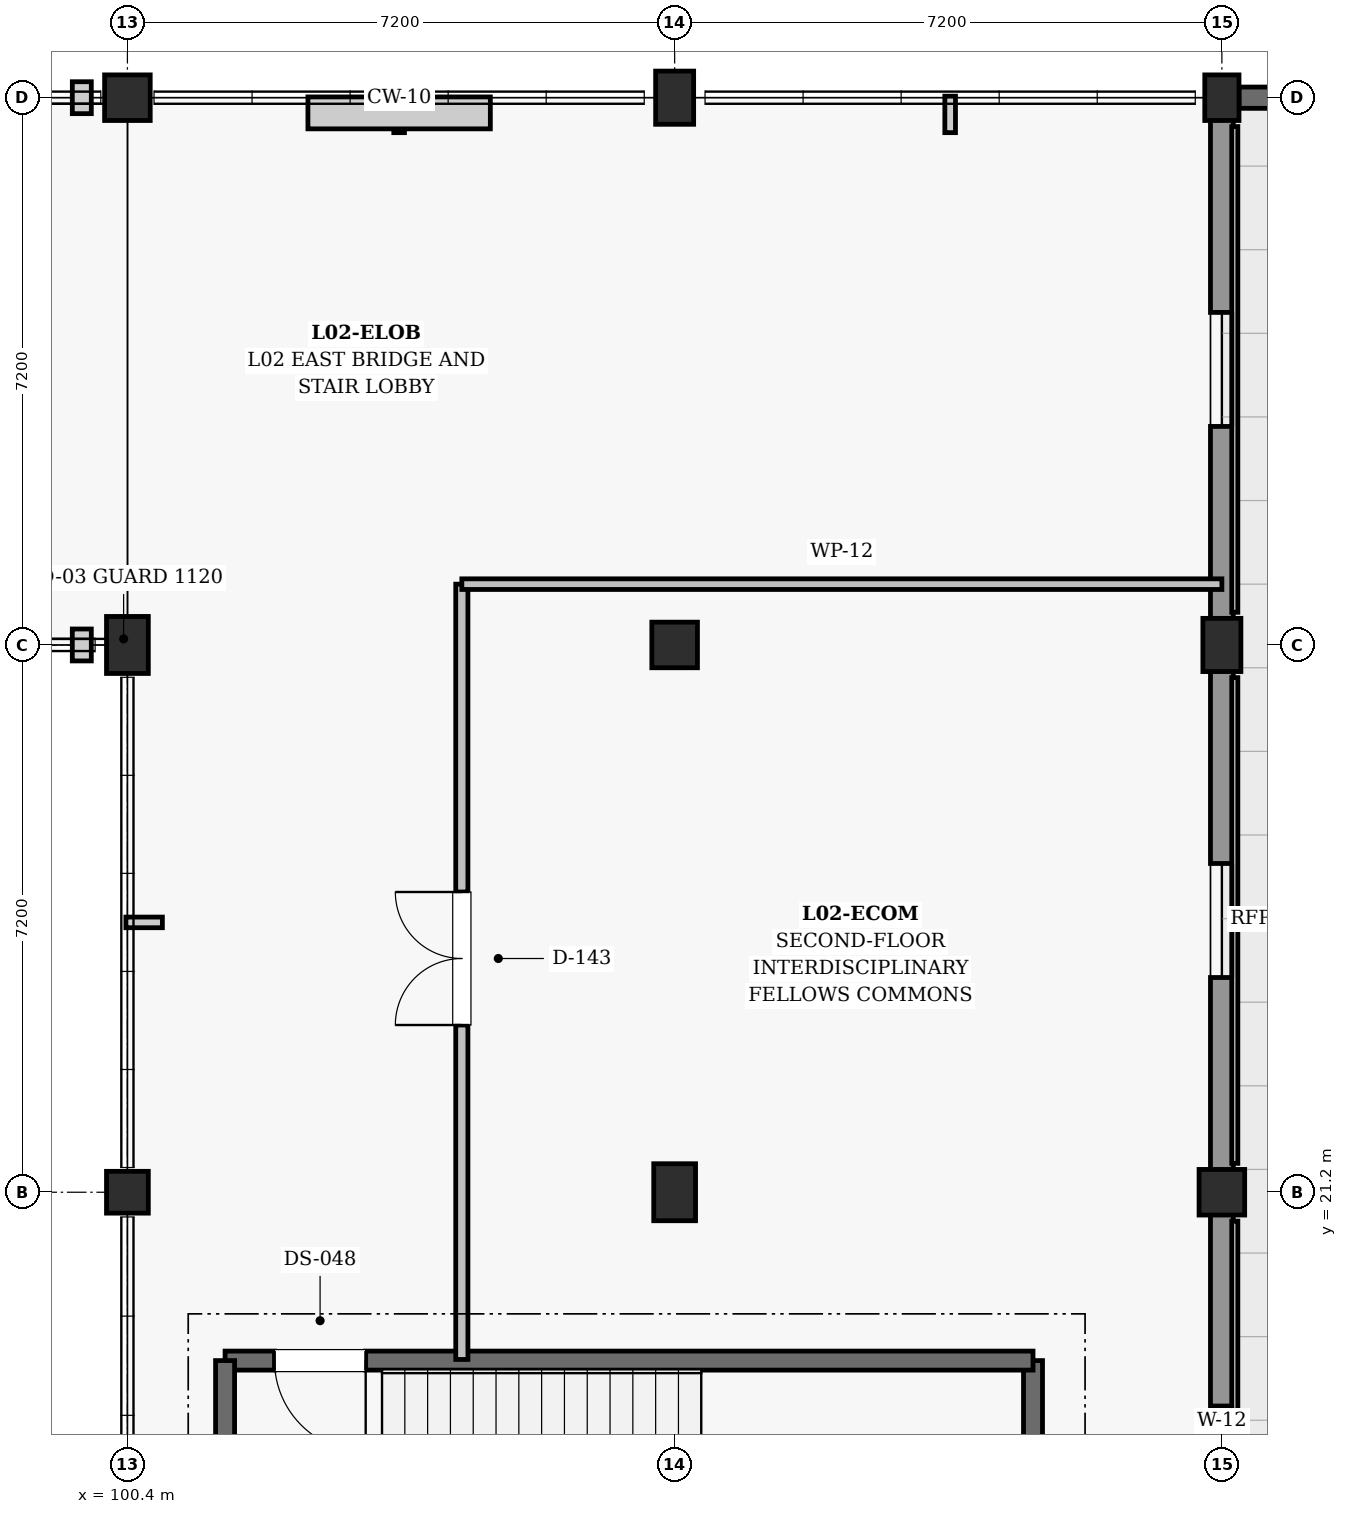
"""IFC4 building model, lengths in metres.
Left out: names, types, materials, properties, quantities, classifications, styles, units other than length and angle.
Written with IfcOpenShell. Run it as: python <this file> out.ifc"""

import sys

from ifc_helpers import new_model, si_unit, direction, frame, frame_2d, origin, origin_2d, place, context, subcontext, project, spatial, polyline, rectangle, outline, extrude, element, fill, save


model = new_model("IFC4")
c1 = context("Model", 3, precision=1e-05, world=origin(), true_north=direction((0.0, 1.0)))
c2 = subcontext(c1, "Body", "Model", "MODEL_VIEW")
j1 = project(units=[si_unit("LENGTHUNIT", "METRE"), si_unit("PLANEANGLEUNIT", "RADIAN")], contexts=[c1])
p1 = place(None, origin())
s1 = spatial("IfcSite", under=j1, at=p1, CompositionType="ELEMENT")
p2 = place(p1, origin())
s2 = spatial("IfcBuilding", under=s1, at=p2, CompositionType="ELEMENT")
p3 = place(p2, frame((0.0, 0.0, 9.9)))
s3 = spatial("IfcBuildingStorey", under=s2, at=p3, CompositionType="ELEMENT", Elevation=9.9)
p4 = place(p3, frame((100.4, 21.2, 0.0), z_axis=(0.0, 0.0, 1.0), x_axis=(1.0, 0.0, 0.0)))
e1 = element("IfcColumn", 1, at=p4, inside=s3, PredefinedType="COLUMN", context=c2, shape_type="SweptSolid", body=[
    extrude(rectangle(XDim=0.55, YDim=0.55, at=origin_2d()), origin(), (0.0, 0.0, 1.0), 4.5),
])
p5 = place(p3, frame((100.4, 28.4, 0.0), z_axis=(0.0, 0.0, 1.0), x_axis=(1.0, 0.0, 0.0)))
e2 = element("IfcColumn", 2, at=p5, inside=s3, PredefinedType="COLUMN", context=c2, shape_type="SweptSolid", body=[
    extrude(rectangle(XDim=0.55, YDim=0.75, at=origin_2d()), origin(), (0.0, 0.0, 1.0), 4.5),
])
p6 = place(p3, frame((100.4, 35.6, 0.0), z_axis=(0.0, 0.0, 1.0), x_axis=(1.0, 0.0, 0.0)))
e3 = element("IfcColumn", 3, at=p6, inside=s3, PredefinedType="COLUMN", context=c2, shape_type="SweptSolid", body=[
    extrude(rectangle(XDim=0.6, YDim=0.6, at=origin_2d()), origin(), (0.0, 0.0, 1.0), 4.5),
])
p7 = place(p3, frame((107.6, 21.2, 0.0), z_axis=(0.0, 0.0, 1.0), x_axis=(1.0, 0.0, 0.0)))
e4 = element("IfcColumn", 4, at=p7, inside=s3, PredefinedType="COLUMN", context=c2, shape_type="SweptSolid", body=[
    extrude(rectangle(XDim=0.55, YDim=0.75, at=origin_2d()), origin(), (0.0, 0.0, 1.0), 4.5),
])
p8 = place(p3, frame((107.6, 28.4, 0.0), z_axis=(0.0, 0.0, 1.0), x_axis=(1.0, 0.0, 0.0)))
e5 = element("IfcColumn", 5, at=p8, inside=s3, PredefinedType="COLUMN", context=c2, shape_type="SweptSolid", body=[
    extrude(rectangle(XDim=0.6, YDim=0.6, at=origin_2d()), origin(), (0.0, 0.0, 1.0), 4.5),
])
p9 = place(p3, frame((107.6, 35.6, 0.0), z_axis=(0.0, 0.0, 1.0), x_axis=(1.0, 0.0, 0.0)))
e6 = element("IfcColumn", 6, at=p9, inside=s3, PredefinedType="COLUMN", context=c2, shape_type="SweptSolid", body=[
    extrude(rectangle(XDim=0.5, YDim=0.7, at=origin_2d()), origin(), (0.0, 0.0, 1.0), 4.5),
])
p10 = place(p3, frame((114.8, 21.2, 0.0), z_axis=(0.0, 0.0, 1.0), x_axis=(1.0, 0.0, 0.0)))
e7 = element("IfcColumn", 7, at=p10, inside=s3, PredefinedType="COLUMN", context=c2, shape_type="SweptSolid", body=[
    extrude(rectangle(XDim=0.6, YDim=0.6, at=origin_2d()), origin(), (0.0, 0.0, 1.0), 4.5),
])
p11 = place(p3, frame((114.8, 28.4, 0.0), z_axis=(0.0, 0.0, 1.0), x_axis=(1.0, 0.0, 0.0)))
e8 = element("IfcColumn", 8, at=p11, inside=s3, PredefinedType="COLUMN", context=c2, shape_type="SweptSolid", body=[
    extrude(rectangle(XDim=0.5, YDim=0.7, at=origin_2d()), origin(), (0.0, 0.0, 1.0), 4.5),
])
p12 = place(p3, frame((114.8, 35.6, 0.0), z_axis=(0.0, 0.0, 1.0), x_axis=(1.0, 0.0, 0.0)))
e9 = element("IfcColumn", 9, at=p12, inside=s3, PredefinedType="COLUMN", context=c2, shape_type="SweptSolid", body=[
    extrude(rectangle(XDim=0.45, YDim=0.6, at=origin_2d()), origin(), (0.0, 0.0, 1.0), 4.5),
])
p13 = place(p3, frame((114.8, 14.355, 0.0), z_axis=(0.0, 0.0, 1.0), x_axis=(0.0, 1.0, 0.0)))
e10 = element("IfcWall", 10, at=p13, inside=s3, PredefinedType="SOLIDWALL", context=c2, shape_type="SweptSolid", body=[
    extrude(rectangle(XDim=6.565, YDim=0.3, at=frame_2d((3.282, 0.0))), origin(), (0.0, 0.0, 1.0), 3.355),
])
p14 = place(p13, frame((2.532, 0.0, 1.85)))
e11 = element("IfcOpeningElement", 11, at=p14, cuts=e10, PredefinedType="OPENING", context=c2, shape_type="SweptSolid", body=[
    extrude(rectangle(XDim=1.5, YDim=1.1, at=frame_2d((0.75, 0.55))), frame((0.0, 0.16, 0.0), z_axis=(0.0, -1.0, 0.0), x_axis=(1.0, 0.0, 0.0)), (0.0, 0.0, 1.0), 0.32),
])
p15 = place(p3, frame((114.8, 21.48, 0.0), z_axis=(0.0, 0.0, 1.0), x_axis=(0.0, 1.0, 0.0)))
e12 = element("IfcWall", 12, at=p15, inside=s3, PredefinedType="SOLIDWALL", context=c2, shape_type="SweptSolid", body=[
    extrude(rectangle(XDim=6.59, YDim=0.3, at=frame_2d((3.295, 0.0))), origin(), (0.0, 0.0, 1.0), 3.355),
])
p16 = place(p15, frame((2.545, 0.0, 1.85)))
e13 = element("IfcOpeningElement", 13, at=p16, cuts=e12, PredefinedType="OPENING", context=c2, shape_type="SweptSolid", body=[
    extrude(rectangle(XDim=1.5, YDim=1.1, at=frame_2d((0.75, 0.55))), frame((0.0, 0.16, 0.0), z_axis=(0.0, -1.0, 0.0), x_axis=(1.0, 0.0, 0.0)), (0.0, 0.0, 1.0), 0.32),
])
p17 = place(p3, frame((114.8, 28.73, 0.0), z_axis=(0.0, 0.0, 1.0), x_axis=(0.0, 1.0, 0.0)))
e14 = element("IfcWall", 14, at=p17, inside=s3, PredefinedType="SOLIDWALL", context=c2, shape_type="SweptSolid", body=[
    extrude(rectangle(XDim=6.59, YDim=0.3, at=frame_2d((3.295, 0.0))), origin(), (0.0, 0.0, 1.0), 3.455),
])
p18 = place(p17, frame((2.545, 0.0, 1.85)))
e15 = element("IfcOpeningElement", 15, at=p18, cuts=e14, PredefinedType="OPENING", context=c2, shape_type="SweptSolid", body=[
    extrude(rectangle(XDim=1.5, YDim=1.1, at=frame_2d((0.75, 0.55))), frame((0.0, 0.16, 0.0), z_axis=(0.0, -1.0, 0.0), x_axis=(1.0, 0.0, 0.0)), (0.0, 0.0, 1.0), 0.32),
])
p19 = place(p3, frame((115.025, 35.6, 0.65), z_axis=(0.0, 0.0, 1.0), x_axis=(1.0, 0.0, 0.0)))
e16 = element("IfcWall", 16, at=p19, inside=s3, PredefinedType="SOLIDWALL", context=c2, shape_type="SweptSolid", body=[
    extrude(outline(polyline([(0.0, 0.0), (3.618, 0.0), (3.618, 0.25), (1.809, 3.17), (0.0, 0.25), (0.0, 0.0)])), frame((0.0, 0.14, 0.0), z_axis=(0.0, -1.0, 0.0), x_axis=(1.0, 0.0, 0.0)), (0.0, 0.0, 1.0), 0.28),
])
p20 = place(p3, frame((112.315, 15.085, 0.0), z_axis=(0.0, 0.0, 1.0), x_axis=(0.0, 1.0, 0.0)))
e17 = element("IfcWall", 17, at=p20, inside=s3, PredefinedType="SHEAR", context=c2, shape_type="SweptSolid", body=[
    extrude(rectangle(XDim=3.9, YDim=0.25, at=frame_2d((1.95, 0.0))), origin(), (0.0, 0.0, 1.0), 4.215),
])
p21 = place(p3, frame((112.315, 18.985, 0.0), z_axis=(0.0, 0.0, 1.0), x_axis=(-1.0, 0.0, 0.0)))
e18 = element("IfcWall", 18, at=p21, inside=s3, PredefinedType="SHEAR", context=c2, shape_type="SweptSolid", body=[
    extrude(rectangle(XDim=10.63, YDim=0.25, at=frame_2d((5.315, 0.0))), origin(), (0.0, 0.0, 1.0), 4.215),
])
p22 = place(p21, frame((8.78, 0.0, 0.0)))
e19 = element("IfcOpeningElement", 19, at=p22, cuts=e18, PredefinedType="OPENING", context=c2, shape_type="SweptSolid", body=[
    extrude(rectangle(XDim=1.2, YDim=2.15, at=frame_2d((0.6, 1.075))), frame((0.0, 0.135, 0.0), z_axis=(0.0, -1.0, 0.0), x_axis=(1.0, 0.0, 0.0)), (0.0, 0.0, 1.0), 0.27),
])
p23 = place(p3, frame((101.685, 18.985, 0.0), z_axis=(0.0, 0.0, 1.0), x_axis=(0.0, -1.0, 0.0)))
e20 = element("IfcWall", 20, at=p23, inside=s3, PredefinedType="SHEAR", context=c2, shape_type="SweptSolid", body=[
    extrude(rectangle(XDim=3.9, YDim=0.25, at=frame_2d((1.95, 0.0))), origin(), (0.0, 0.0, 1.0), 4.215),
])
p24 = place(p3, frame((104.8, 19.0, 0.0), z_axis=(0.0, 0.0, 1.0), x_axis=(0.0, 1.0, 0.0)))
e21 = element("IfcWall", 21, at=p24, inside=s3, PredefinedType="PARTITIONING", context=c2, shape_type="SweptSolid", body=[
    extrude(rectangle(XDim=10.2, YDim=0.16, at=frame_2d((5.1, 0.0))), origin(), (0.0, 0.0, 1.0), 3.41),
])
p25 = place(p24, frame((4.4, 0.0, 0.0)))
e22 = element("IfcOpeningElement", 22, at=p25, cuts=e21, PredefinedType="OPENING", context=c2, shape_type="SweptSolid", body=[
    extrude(rectangle(XDim=1.75, YDim=2.25, at=frame_2d((0.875, 1.125))), frame((0.0, 0.09, 0.0), z_axis=(0.0, -1.0, 0.0), x_axis=(1.0, 0.0, 0.0)), (0.0, 0.0, 1.0), 0.18),
])
p26 = place(p3, frame((104.8, 29.2, 0.0), z_axis=(0.0, 0.0, 1.0), x_axis=(1.0, 0.0, 0.0)))
e23 = element("IfcWall", 23, at=p26, inside=s3, PredefinedType="PARTITIONING", context=c2, shape_type="SweptSolid", body=[
    extrude(rectangle(XDim=10.0, YDim=0.14, at=frame_2d((5.0, 0.0))), origin(), (0.0, 0.0, 1.0), 3.46),
])
p27 = place(p14, origin())
e24 = element("IfcWindow", 24, at=p27, inside=s3, PartitioningType="SINGLE_PANEL", PredefinedType="WINDOW", context=c2, shape_type="SweptSolid", body=[
    extrude(rectangle(XDim=1.5, YDim=1.1, at=frame_2d((0.75, 0.55))), frame((0.0, 0.03, 0.0), z_axis=(0.0, -1.0, 0.0), x_axis=(1.0, 0.0, 0.0)), (0.0, 0.0, 1.0), 0.06),
])
fill(e11, e24)
p28 = place(p16, origin())
e25 = element("IfcWindow", 25, at=p28, inside=s3, PartitioningType="SINGLE_PANEL", PredefinedType="WINDOW", context=c2, shape_type="SweptSolid", body=[
    extrude(rectangle(XDim=1.5, YDim=1.1, at=frame_2d((0.75, 0.55))), frame((0.0, 0.03, 0.0), z_axis=(0.0, -1.0, 0.0), x_axis=(1.0, 0.0, 0.0)), (0.0, 0.0, 1.0), 0.06),
])
fill(e13, e25)
p29 = place(p18, origin())
e26 = element("IfcWindow", 26, at=p29, inside=s3, PartitioningType="SINGLE_PANEL", PredefinedType="WINDOW", context=c2, shape_type="SweptSolid", body=[
    extrude(rectangle(XDim=1.5, YDim=1.1, at=frame_2d((0.75, 0.55))), frame((0.0, 0.03, 0.0), z_axis=(0.0, -1.0, 0.0), x_axis=(1.0, 0.0, 0.0)), (0.0, 0.0, 1.0), 0.06),
])
fill(e15, e26)
p30 = place(p22, origin())
e27 = element("IfcDoor", 27, at=p30, inside=s3, OperationType="SINGLE_SWING_LEFT", PredefinedType="DOOR", context=c2, shape_type="SweptSolid", body=[
    extrude(rectangle(XDim=1.2, YDim=2.15, at=frame_2d((0.6, 1.075))), frame((0.0, 0.025, 0.0), z_axis=(0.0, -1.0, 0.0), x_axis=(1.0, 0.0, 0.0)), (0.0, 0.0, 1.0), 0.05),
])
fill(e19, e27)
p31 = place(p25, origin())
e28 = element("IfcDoor", 28, at=p31, inside=s3, OperationType="DOUBLE_DOOR_SINGLE_SWING", PredefinedType="DOOR", context=c2, shape_type="SweptSolid", body=[
    extrude(rectangle(XDim=1.75, YDim=2.25, at=frame_2d((0.875, 1.125))), frame((0.0, 0.025, 0.0), z_axis=(0.0, -1.0, 0.0), x_axis=(1.0, 0.0, 0.0)), (0.0, 0.0, 1.0), 0.05),
])
fill(e22, e28)
save(model, sys.argv[1])
